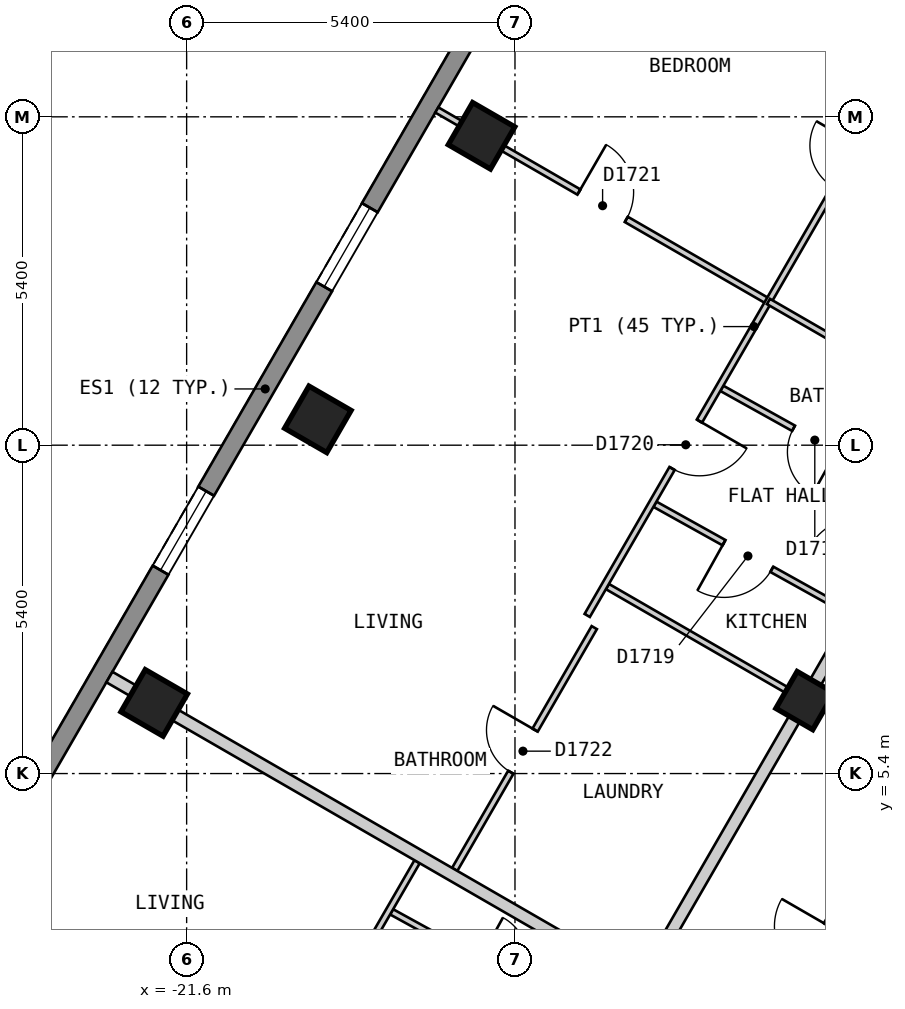
"""IFC4 building model, lengths in metres.
Left out: names, types, materials, properties, quantities, classifications, styles, units other than length and angle.
Written with IfcOpenShell. Run it as: python <this file> out.ifc"""

import sys

from ifc_helpers import new_model, si_unit, direction, frame, frame_2d, origin, origin_2d, place, context, subcontext, project, spatial, polyline, rectangle, outline, extrude, element, fill, save


model = new_model("IFC4")
c1 = context("Model", 3, precision=1e-05, world=origin(), true_north=direction((0.0, 1.0)))
c2 = subcontext(c1, "Body", "Model", "MODEL_VIEW")
j1 = project(units=[si_unit("LENGTHUNIT", "METRE"), si_unit("PLANEANGLEUNIT", "RADIAN")], contexts=[c1])
p1 = place(None, origin())
s1 = spatial("IfcSite", under=j1, at=p1, CompositionType="ELEMENT")
p2 = place(p1, origin())
s2 = spatial("IfcBuilding", under=s1, at=p2, CompositionType="ELEMENT")
p3 = place(p2, frame((0.0, 0.0, 181.2)))
s3 = spatial("IfcBuildingStorey", under=s2, at=p3, CompositionType="ELEMENT", Elevation=181.2)
for number, where, z_axis, x_axis in (
    (1, (-16.75, 15.888, 0.0), (0.0, 0.0, 1.0), (-0.5, -0.866, 0.0)),
    (2, (-19.442, 11.225, 0.0), (0.0, 0.0, 1.0), (-0.5, -0.866, 0.0)),
    (3, (-22.134, 6.562, 0.0), (0.0, 0.0, 1.0), (-0.5, -0.866, 0.0)),
):
    element("IfcColumn", number, at=place(p3, frame(where, z_axis=z_axis, x_axis=x_axis)), inside=s3, PredefinedType="COLUMN", context=c2, shape_type="SweptSolid", body=[
        extrude(rectangle(XDim=0.8, YDim=0.8, at=origin_2d()), origin(), (0.0, 0.0, 1.0), 3.0),
    ])
p4 = place(p3, frame((-11.431, 6.6, 0.0), z_axis=(0.0, 0.0, 1.0), x_axis=(-0.5, -0.866025403784, 0.0)))
e4 = element("IfcColumn", 4, at=p4, inside=s3, PredefinedType="COLUMN", context=c2, shape_type="SweptSolid", body=[
    extrude(rectangle(XDim=0.7, YDim=0.7, at=origin_2d()), origin(), (0.0, 0.0, 1.0), 3.0),
])
p5 = place(p3, frame((-14.592, 21.625, 0.0), z_axis=(0.0, 0.0, 1.0), x_axis=(-0.500010537973, -0.866019319597, 0.0)))
e5 = element("IfcWall", 5, at=p5, inside=s3, PredefinedType="SOLIDWALL", context=c2, shape_type="SweptSolid", body=[
    extrude(outline(polyline([(0.0, -0.15), (22.863, -0.15), (22.783, 0.15), (0.08, 0.15), (0.0, -0.15)])), origin(), (0.0, 0.0, 1.0), 2.7),
])
p6 = place(p5, frame((2.606, 0.0, 0.15)))
e6 = element("IfcOpeningElement", 6, at=p6, cuts=e5, PredefinedType="OPENING", context=c2, shape_type="SweptSolid", body=[
    extrude(rectangle(XDim=1.5, YDim=2.1, at=frame_2d((0.75, 1.05))), frame((0.0, 0.16, 0.0), z_axis=(0.0, -1.0, 0.0), x_axis=(1.0, 0.0, 0.0)), (0.0, 0.0, 1.0), 0.32),
])
p7 = place(p5, frame((7.99, 0.0, 0.15)))
e7 = element("IfcOpeningElement", 7, at=p7, cuts=e5, PredefinedType="OPENING", context=c2, shape_type="SweptSolid", body=[
    extrude(rectangle(XDim=1.5, YDim=2.1, at=frame_2d((0.75, 1.05))), frame((0.0, 0.16, 0.0), z_axis=(0.0, -1.0, 0.0), x_axis=(1.0, 0.0, 0.0)), (0.0, 0.0, 1.0), 0.32),
])
p8 = place(p5, frame((13.373, 0.0, 0.15)))
e8 = element("IfcOpeningElement", 8, at=p8, cuts=e5, PredefinedType="OPENING", context=c2, shape_type="SweptSolid", body=[
    extrude(rectangle(XDim=1.5, YDim=2.1, at=frame_2d((0.75, 1.05))), frame((0.0, 0.16, 0.0), z_axis=(0.0, -1.0, 0.0), x_axis=(1.0, 0.0, 0.0)), (0.0, 0.0, 1.0), 0.32),
])
p9 = place(p5, frame((18.758, 0.0, 0.15)))
e9 = element("IfcOpeningElement", 9, at=p9, cuts=e5, PredefinedType="OPENING", context=c2, shape_type="SweptSolid", body=[
    extrude(rectangle(XDim=1.5, YDim=2.1, at=frame_2d((0.75, 1.05))), frame((0.0, 0.16, 0.0), z_axis=(0.0, -1.0, 0.0), x_axis=(1.0, 0.0, 0.0)), (0.0, 0.0, 1.0), 0.32),
])
p10 = place(p3, frame((-13.048, -0.601, 0.0), z_axis=(0.0, 0.0, 1.0), x_axis=(0.499982180423, 0.866035691677, 0.0)))
e10 = element("IfcWall", 10, at=p10, inside=s3, PredefinedType="PARTITIONING", context=c2, shape_type="SweptSolid", body=[
    extrude(rectangle(XDim=7.16, YDim=0.2, at=frame_2d((3.58, 0.0))), origin(), (0.0, 0.0, 1.0), 2.7),
])
p11 = place(p10, frame((3.13, 0.0, 0.0)))
e11 = element("IfcOpeningElement", 11, at=p11, cuts=e10, PredefinedType="OPENING", context=c2, shape_type="SweptSolid", body=[
    extrude(rectangle(XDim=0.9, YDim=2.1, at=frame_2d((0.45, 1.05))), frame((0.0, 0.11, 0.0), z_axis=(0.0, -1.0, 0.0), x_axis=(1.0, 0.0, 0.0)), (0.0, 0.0, 1.0), 0.22),
])
p12 = place(p3, frame((-15.53, -0.501, 0.0), z_axis=(0.0, 0.0, 1.0), x_axis=(0.499952498232, 0.866052827206, 0.0)))
e12 = element("IfcWall", 12, at=p12, inside=s3, PredefinedType="PARTITIONING", context=c2, shape_type="SweptSolid", body=[
    extrude(rectangle(XDim=9.585, YDim=0.2, at=frame_2d((4.792, 0.0))), origin(), (0.0, 0.0, 1.0), 2.7),
])
p13 = place(p12, frame((0.525, 0.0, 0.0)))
e13 = element("IfcOpeningElement", 13, at=p13, cuts=e12, PredefinedType="OPENING", context=c2, shape_type="SweptSolid", body=[
    extrude(rectangle(XDim=1.0, YDim=2.1, at=frame_2d((0.5, 1.05))), frame((0.0, 0.11, 0.0), z_axis=(0.0, -1.0, 0.0), x_axis=(1.0, 0.0, 0.0)), (0.0, 0.0, 1.0), 0.22),
])
p14 = place(p3, frame((-18.229, 3.126, 0.0), z_axis=(0.0, 0.0, 1.0), x_axis=(0.876123002581, -0.482087631399, 0.0)))
e14 = element("IfcWall", 14, at=p14, inside=s3, PredefinedType="PARTITIONING", context=c2, shape_type="SweptSolid", body=[
    extrude(rectangle(XDim=4.051, YDim=0.1, at=frame_2d((2.025, 0.0))), origin(), (0.0, 0.0, 1.0), 2.7),
])
p15 = place(p14, frame((1.65, 0.0, 0.0)))
e15 = element("IfcOpeningElement", 15, at=p15, cuts=e14, PredefinedType="OPENING", context=c2, shape_type="SweptSolid", body=[
    extrude(rectangle(XDim=0.8, YDim=2.1, at=frame_2d((0.4, 1.05))), frame((0.0, 0.06, 0.0), z_axis=(0.0, -1.0, 0.0), x_axis=(1.0, 0.0, 0.0)), (0.0, 0.0, 1.0), 0.12),
])
p16 = place(p3, frame((-12.798, 11.735, 0.0), z_axis=(0.0, 0.0, 1.0), x_axis=(0.873649600774, -0.486555623816, 0.0)))
e16 = element("IfcWall", 16, at=p16, inside=s3, PredefinedType="PARTITIONING", context=c2, shape_type="SweptSolid", body=[
    extrude(rectangle(XDim=3.451, YDim=0.1, at=frame_2d((1.726, 0.0))), origin(), (0.0, 0.0, 1.0), 2.7),
])
p17 = place(p16, frame((1.35, 0.0, 0.0)))
e17 = element("IfcOpeningElement", 17, at=p17, cuts=e16, PredefinedType="OPENING", context=c2, shape_type="SweptSolid", body=[
    extrude(rectangle(XDim=0.8, YDim=2.1, at=frame_2d((0.4, 1.05))), frame((0.0, 0.06, 0.0), z_axis=(0.0, -1.0, 0.0), x_axis=(1.0, 0.0, 0.0)), (0.0, 0.0, 1.0), 0.12),
])
p18 = place(p3, frame((-13.898, 9.829, 0.0), z_axis=(0.0, 0.0, 1.0), x_axis=(0.873715787747, -0.486436760784, 0.0)))
e18 = element("IfcWall", 18, at=p18, inside=s3, PredefinedType="PARTITIONING", context=c2, shape_type="SweptSolid", body=[
    extrude(rectangle(XDim=3.55, YDim=0.1, at=frame_2d((1.775, 0.0))), origin(), (0.0, 0.0, 1.0), 2.7),
])
p19 = place(p18, frame((1.3, 0.0, 0.0)))
e19 = element("IfcOpeningElement", 19, at=p19, cuts=e18, PredefinedType="OPENING", context=c2, shape_type="SweptSolid", body=[
    extrude(rectangle(XDim=0.9, YDim=2.1, at=frame_2d((0.45, 1.05))), frame((0.0, 0.06, 0.0), z_axis=(0.0, -1.0, 0.0), x_axis=(1.0, 0.0, 0.0)), (0.0, 0.0, 1.0), 0.12),
])
p20 = place(p3, frame((-14.679, 8.475, 0.0), z_axis=(0.0, 0.0, 1.0), x_axis=(0.865995104784, -0.500052475737, 0.0)))
e20 = element("IfcWall", 20, at=p20, inside=s3, PredefinedType="PARTITIONING", context=c2, shape_type="SweptSolid", body=[
    extrude(rectangle(XDim=3.65, YDim=0.1, at=frame_2d((1.825, 0.0))), origin(), (0.0, 0.0, 1.0), 2.7),
])
p21 = place(p3, frame((-17.486, 16.313, 0.0), z_axis=(0.0, 0.0, 1.0), x_axis=(0.865997114097, -0.500048995975, 0.0)))
e21 = element("IfcWall", 21, at=p21, inside=s3, PredefinedType="PARTITIONING", context=c2, shape_type="SweptSolid", body=[
    extrude(rectangle(XDim=6.299, YDim=0.1, at=frame_2d((3.149, 0.0))), origin(), (0.0, 0.0, 1.0), 2.7),
])
p22 = place(p21, frame((2.699, 0.0, 0.0)))
e22 = element("IfcOpeningElement", 22, at=p22, cuts=e21, PredefinedType="OPENING", context=c2, shape_type="SweptSolid", body=[
    extrude(rectangle(XDim=0.9, YDim=2.1, at=frame_2d((0.45, 1.05))), frame((0.0, 0.06, 0.0), z_axis=(0.0, -1.0, 0.0), x_axis=(1.0, 0.0, 0.0)), (0.0, 0.0, 1.0), 0.12),
])
p23 = place(p3, frame((-17.191, 3.824, 0.0), z_axis=(0.0, 0.0, 1.0), x_axis=(0.499891250406, 0.866088181288, 0.0)))
e23 = element("IfcWall", 23, at=p23, inside=s3, PredefinedType="PARTITIONING", context=c2, shape_type="SweptSolid", body=[
    extrude(rectangle(XDim=4.591, YDim=0.1, at=frame_2d((2.295, 0.0))), origin(), (0.0, 0.0, 1.0), 2.7),
])
p24 = place(p23, frame((1.845, 0.0, 0.0)))
e24 = element("IfcOpeningElement", 24, at=p24, cuts=e23, PredefinedType="OPENING", context=c2, shape_type="SweptSolid", body=[
    extrude(rectangle(XDim=0.8, YDim=2.1, at=frame_2d((0.4, 1.05))), frame((0.0, 0.06, 0.0), z_axis=(0.0, -1.0, 0.0), x_axis=(1.0, 0.0, 0.0)), (0.0, 0.0, 1.0), 0.12),
])
p25 = place(p3, frame((-15.012, 8.0, 0.0), z_axis=(0.0, 0.0, 1.0), x_axis=(0.500047346826, 0.865998066356, 0.0)))
e25 = element("IfcWall", 25, at=p25, inside=s3, PredefinedType="PARTITIONING", context=c2, shape_type="SweptSolid", body=[
    extrude(rectangle(XDim=10.971, YDim=0.1, at=frame_2d((5.486, 0.0))), origin(), (0.0, 0.0, 1.0), 2.7),
])
p26 = place(p25, frame((2.791, 0.0, 0.0)))
e26 = element("IfcOpeningElement", 26, at=p26, cuts=e25, PredefinedType="OPENING", context=c2, shape_type="SweptSolid", body=[
    extrude(rectangle(XDim=0.9, YDim=2.1, at=frame_2d((0.45, 1.05))), frame((0.0, 0.06, 0.0), z_axis=(0.0, -1.0, 0.0), x_axis=(1.0, 0.0, 0.0)), (0.0, 0.0, 1.0), 0.12),
])
p27 = place(p25, frame((8.124, 0.0, 0.0)))
e27 = element("IfcOpeningElement", 27, at=p27, cuts=e25, PredefinedType="OPENING", context=c2, shape_type="SweptSolid", body=[
    extrude(rectangle(XDim=0.8, YDim=2.1, at=frame_2d((0.4, 1.05))), frame((0.0, 0.06, 0.0), z_axis=(0.0, -1.0, 0.0), x_axis=(1.0, 0.0, 0.0)), (0.0, 0.0, 1.0), 0.12),
])
p28 = place(p3, frame((-19.283, 1.4, 0.0), z_axis=(0.0, 0.0, 1.0), x_axis=(0.500160189342, 0.865932898669, 0.0)))
e28 = element("IfcWall", 28, at=p28, inside=s3, PredefinedType="PARTITIONING", context=c2, shape_type="SweptSolid", body=[
    extrude(rectangle(XDim=2.945, YDim=0.1, at=frame_2d((1.472, 0.0))), origin(), (0.0, 0.0, 1.0), 2.7),
])
p29 = place(p28, frame((0.721, 0.0, 0.0)))
e29 = element("IfcOpeningElement", 29, at=p29, cuts=e28, PredefinedType="OPENING", context=c2, shape_type="SweptSolid", body=[
    extrude(rectangle(XDim=0.9, YDim=2.1, at=frame_2d((0.45, 1.05))), frame((0.0, 0.06, 0.0), z_axis=(0.0, -1.0, 0.0), x_axis=(1.0, 0.0, 0.0)), (0.0, 0.0, 1.0), 0.12),
])
p30 = place(p3, frame((-22.87, 6.987, 0.0), z_axis=(0.0, 0.0, 1.0), x_axis=(0.866022959057, -0.500004234368, 0.0)))
e30 = element("IfcWall", 30, at=p30, inside=s3, PredefinedType="PARTITIONING", context=c2, shape_type="SweptSolid", body=[
    extrude(rectangle(XDim=10.0, YDim=0.2, at=frame_2d((5.0, 0.0))), origin(), (0.0, 0.0, 1.0), 2.7),
])
p31 = place(p3, frame((-12.031, 13.163, 0.0), z_axis=(0.0, 0.0, 1.0), x_axis=(0.86608920467, -0.499889477339, 0.0)))
e31 = element("IfcWall", 31, at=p31, inside=s3, PredefinedType="PARTITIONING", context=c2, shape_type="SweptSolid", body=[
    extrude(rectangle(XDim=3.501, YDim=0.1, at=frame_2d((1.75, 0.0))), origin(), (0.0, 0.0, 1.0), 2.7),
])
p32 = place(p7, origin())
e32 = element("IfcWindow", 32, at=p32, inside=s3, PartitioningType="SINGLE_PANEL", PredefinedType="WINDOW", context=c2, shape_type="SweptSolid", body=[
    extrude(rectangle(XDim=1.5, YDim=2.1, at=frame_2d((0.75, 1.05))), frame((0.0, 0.03, 0.0), z_axis=(0.0, -1.0, 0.0), x_axis=(1.0, 0.0, 0.0)), (0.0, 0.0, 1.0), 0.06),
])
fill(e7, e32)
p33 = place(p8, origin())
e33 = element("IfcWindow", 33, at=p33, inside=s3, PartitioningType="SINGLE_PANEL", PredefinedType="WINDOW", context=c2, shape_type="SweptSolid", body=[
    extrude(rectangle(XDim=1.5, YDim=2.1, at=frame_2d((0.75, 1.05))), frame((0.0, 0.03, 0.0), z_axis=(0.0, -1.0, 0.0), x_axis=(1.0, 0.0, 0.0)), (0.0, 0.0, 1.0), 0.06),
])
fill(e8, e33)
p34 = place(p17, origin())
e34 = element("IfcDoor", 34, at=p34, inside=s3, OperationType="SINGLE_SWING_RIGHT", PredefinedType="DOOR", context=c2, shape_type="SweptSolid", body=[
    extrude(rectangle(XDim=0.8, YDim=2.1, at=frame_2d((0.4, 1.05))), frame((0.0, 0.025, 0.0), z_axis=(0.0, -1.0, 0.0), x_axis=(1.0, 0.0, 0.0)), (0.0, 0.0, 1.0), 0.05),
])
fill(e17, e34)
p35 = place(p19, origin())
e35 = element("IfcDoor", 35, at=p35, inside=s3, OperationType="SINGLE_SWING_LEFT", PredefinedType="DOOR", context=c2, shape_type="SweptSolid", body=[
    extrude(rectangle(XDim=0.9, YDim=2.1, at=frame_2d((0.45, 1.05))), frame((0.0, 0.025, 0.0), z_axis=(0.0, -1.0, 0.0), x_axis=(1.0, 0.0, 0.0)), (0.0, 0.0, 1.0), 0.05),
])
fill(e19, e35)
p36 = place(p26, origin())
e36 = element("IfcDoor", 36, at=p36, inside=s3, OperationType="SINGLE_SWING_RIGHT", PredefinedType="DOOR", context=c2, shape_type="SweptSolid", body=[
    extrude(rectangle(XDim=0.9, YDim=2.1, at=frame_2d((0.45, 1.05))), frame((0.0, 0.025, 0.0), z_axis=(0.0, -1.0, 0.0), x_axis=(1.0, 0.0, 0.0)), (0.0, 0.0, 1.0), 0.05),
])
fill(e26, e36)
p37 = place(p22, origin())
e37 = element("IfcDoor", 37, at=p37, inside=s3, OperationType="SINGLE_SWING_LEFT", PredefinedType="DOOR", context=c2, shape_type="SweptSolid", body=[
    extrude(rectangle(XDim=0.9, YDim=2.1, at=frame_2d((0.45, 1.05))), frame((0.0, 0.025, 0.0), z_axis=(0.0, -1.0, 0.0), x_axis=(1.0, 0.0, 0.0)), (0.0, 0.0, 1.0), 0.05),
])
fill(e22, e37)
p38 = place(p24, origin())
e38 = element("IfcDoor", 38, at=p38, inside=s3, OperationType="SINGLE_SWING_RIGHT", PredefinedType="DOOR", context=c2, shape_type="SweptSolid", body=[
    extrude(rectangle(XDim=0.8, YDim=2.1, at=frame_2d((0.4, 1.05))), frame((0.0, 0.025, 0.0), z_axis=(0.0, -1.0, 0.0), x_axis=(1.0, 0.0, 0.0)), (0.0, 0.0, 1.0), 0.05),
])
fill(e24, e38)
p39 = place(p11, origin())
e39 = element("IfcDoor", 39, at=p39, inside=s3, OperationType="SINGLE_SWING_RIGHT", PredefinedType="DOOR", context=c2, shape_type="SweptSolid", body=[
    extrude(rectangle(XDim=0.9, YDim=2.1, at=frame_2d((0.45, 1.05))), frame((0.0, 0.025, 0.0), z_axis=(0.0, -1.0, 0.0), x_axis=(1.0, 0.0, 0.0)), (0.0, 0.0, 1.0), 0.05),
])
fill(e11, e39)
save(model, sys.argv[1])
